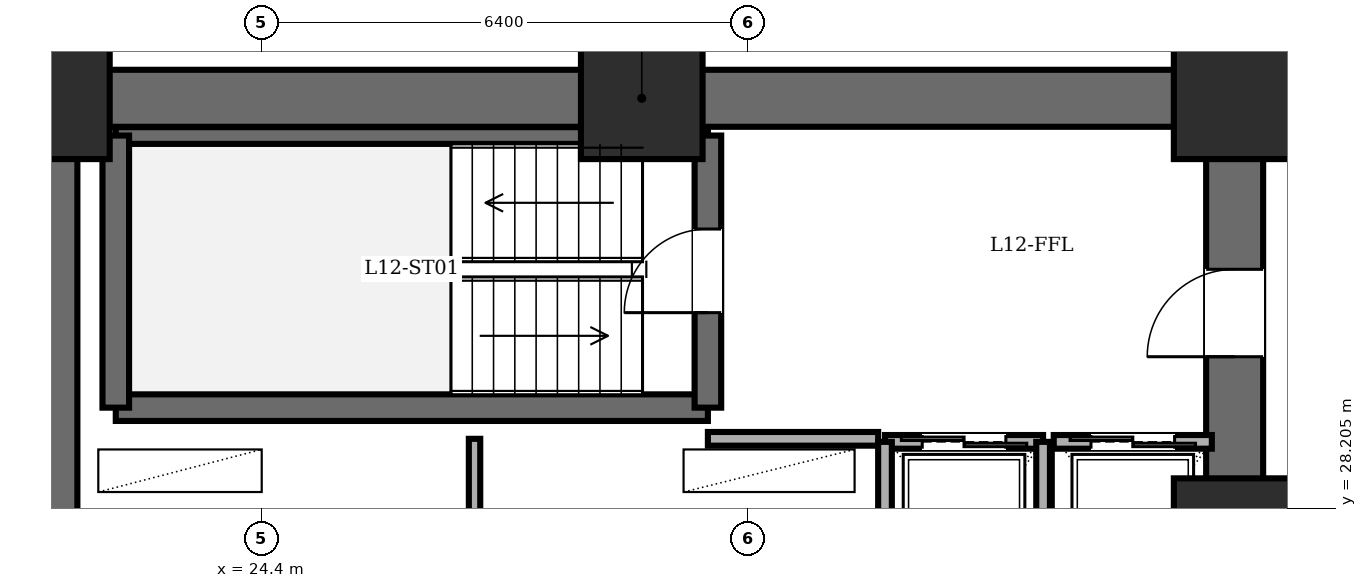
"""IFC4 building model, lengths in metres.
Left out: names, types, materials, properties, quantities, classifications, styles, units other than length and angle.
Written with IfcOpenShell. Run it as: python <this file> out.ifc"""

import sys

from ifc_helpers import new_model, si_unit, direction, frame, frame_2d, origin, origin_2d, place, context, subcontext, project, spatial, rectangle, extrude, element, fill, save


model = new_model("IFC4")
c1 = context("Model", 3, precision=1e-05, world=origin(), true_north=direction((0.0, 1.0)))
c2 = subcontext(c1, "Body", "Model", "MODEL_VIEW")
j1 = project(units=[si_unit("LENGTHUNIT", "METRE"), si_unit("PLANEANGLEUNIT", "RADIAN")], contexts=[c1])
p1 = place(None, origin())
s1 = spatial("IfcSite", under=j1, at=p1, CompositionType="ELEMENT")
p2 = place(p1, origin())
s2 = spatial("IfcBuilding", under=s1, at=p2, CompositionType="ELEMENT")
p3 = place(p2, frame((0.0, 0.0, 46.8)))
s3 = spatial("IfcBuildingStorey", under=s2, at=p3, CompositionType="ELEMENT", Elevation=46.8)
for number, where, z_axis, x_axis in (
    (1, (37.2, 27.8, 0.0), (0.0, 0.0, 1.0), (1.0, 0.0, 0.0)),
    (2, (37.2, 33.6, 0.0), (0.0, 0.0, 1.0), (1.0, 0.0, 0.0)),
    (3, (29.4, 33.6, 0.0), (0.0, 0.0, 1.0), (1.0, 0.0, 0.0)),
    (4, (21.6, 33.6, 0.0), (0.0, 0.0, 1.0), (1.0, 0.0, 0.0)),
):
    element("IfcColumn", number, at=place(p3, frame(where, z_axis=z_axis, x_axis=x_axis)), inside=s3, PredefinedType="COLUMN", context=c2, shape_type="SweptSolid", body=[
        extrude(rectangle(XDim=1.6, YDim=1.6, at=origin_2d()), origin(), (0.0, 0.0, 1.0), 3.6),
    ])
p4 = place(p3, frame((21.6, 14.4, 0.0), z_axis=(0.0, 0.0, 1.0), x_axis=(0.0, 1.0, 0.0)))
e5 = element("IfcWall", 5, at=p4, inside=s3, PredefinedType="SHEAR", context=c2, shape_type="SweptSolid", body=[
    extrude(rectangle(XDim=19.2, YDim=0.75, at=frame_2d((9.6, 0.0))), origin(), (0.0, 0.0, 1.0), 3.4),
])
p5 = place(p3, frame((21.6, 33.6, 0.0), z_axis=(0.0, 0.0, 1.0), x_axis=(1.0, 0.0, 0.0)))
e6 = element("IfcWall", 6, at=p5, inside=s3, PredefinedType="SHEAR", context=c2, shape_type="SweptSolid", body=[
    extrude(rectangle(XDim=15.6, YDim=0.75, at=frame_2d((7.8, 0.0))), origin(), (0.0, 0.0, 1.0), 3.4),
])
p6 = place(p3, frame((37.2, 14.4, 0.0), z_axis=(0.0, 0.0, 1.0), x_axis=(0.0, 1.0, 0.0)))
e7 = element("IfcWall", 7, at=p6, inside=s3, PredefinedType="SHEAR", context=c2, shape_type="SweptSolid", body=[
    extrude(rectangle(XDim=19.2, YDim=0.75, at=frame_2d((9.6, 0.0))), origin(), (0.0, 0.0, 1.0), 3.4),
])
p7 = place(p6, frame((15.8, 0.0, 0.0)))
e8 = element("IfcOpeningElement", 8, at=p7, cuts=e7, PredefinedType="OPENING", context=c2, shape_type="SweptSolid", body=[
    extrude(rectangle(XDim=1.15, YDim=2.15, at=frame_2d((0.575, 1.075))), frame((0.0, 0.385, 0.0), z_axis=(0.0, -1.0, 0.0), x_axis=(1.0, 0.0, 0.0)), (0.0, 0.0, 1.0), 0.77),
])
p8 = place(p6, frame((3.6, 0.0, 0.0)))
e9 = element("IfcOpeningElement", 9, at=p8, cuts=e7, PredefinedType="OPENING", context=c2, shape_type="SweptSolid", body=[
    extrude(rectangle(XDim=1.1, YDim=2.15, at=frame_2d((0.55, 1.075))), frame((0.0, 0.385, 0.0), z_axis=(0.0, -1.0, 0.0), x_axis=(1.0, 0.0, 0.0)), (0.0, 0.0, 1.0), 0.77),
])
p9 = place(p6, frame((8.6, 0.0, 0.0)))
e10 = element("IfcOpeningElement", 10, at=p9, cuts=e7, PredefinedType="OPENING", context=c2, shape_type="SweptSolid", body=[
    extrude(rectangle(XDim=1.3, YDim=2.2, at=frame_2d((0.65, 1.1))), frame((0.0, 0.385, 0.0), z_axis=(0.0, -1.0, 0.0), x_axis=(1.0, 0.0, 0.0)), (0.0, 0.0, 1.0), 0.77),
])
p10 = place(p3, frame((22.48, 29.53, 0.0), z_axis=(0.0, 0.0, 1.0), x_axis=(1.0, 0.0, 0.0)))
e11 = element("IfcWall", 11, at=p10, inside=s3, PredefinedType="SOLIDWALL", context=c2, shape_type="SweptSolid", body=[
    extrude(rectangle(XDim=7.79, YDim=0.35, at=frame_2d((3.895, 0.0))), origin(), (0.0, 0.0, 1.0), 3.4),
])
p11 = place(p3, frame((22.48, 33.11, 0.0), z_axis=(0.0, 0.0, 1.0), x_axis=(1.0, 0.0, 0.0)))
e12 = element("IfcWall", 12, at=p11, inside=s3, PredefinedType="PARTITIONING", context=c2, shape_type="SweptSolid", body=[
    extrude(rectangle(XDim=7.79, YDim=0.22, at=frame_2d((3.895, 0.0))), origin(), (0.0, 0.0, 1.0), 3.4),
])
p12 = place(p3, frame((22.48, 29.53, 0.0), z_axis=(0.0, 0.0, 1.0), x_axis=(0.0, 1.0, 0.0)))
e13 = element("IfcWall", 13, at=p12, inside=s3, PredefinedType="SOLIDWALL", context=c2, shape_type="SweptSolid", body=[
    extrude(rectangle(XDim=3.58, YDim=0.35, at=frame_2d((1.79, 0.0))), origin(), (0.0, 0.0, 1.0), 3.4),
])
p13 = place(p3, frame((30.27, 29.53, 0.0), z_axis=(0.0, 0.0, 1.0), x_axis=(0.0, 1.0, 0.0)))
e14 = element("IfcWall", 14, at=p13, inside=s3, PredefinedType="SOLIDWALL", context=c2, shape_type="SweptSolid", body=[
    extrude(rectangle(XDim=3.58, YDim=0.35, at=frame_2d((1.79, 0.0))), origin(), (0.0, 0.0, 1.0), 3.4),
])
p14 = place(p13, frame((1.25, 0.0, 0.0)))
e15 = element("IfcOpeningElement", 15, at=p14, cuts=e14, PredefinedType="OPENING", context=c2, shape_type="SweptSolid", body=[
    extrude(rectangle(XDim=1.1, YDim=2.15, at=frame_2d((0.55, 1.075))), frame((0.0, 0.185, 0.0), z_axis=(0.0, -1.0, 0.0), x_axis=(1.0, 0.0, 0.0)), (0.0, 0.0, 1.0), 0.37),
])
p15 = place(p3, frame((30.27, 29.12, 0.0), z_axis=(0.0, 0.0, 1.0), x_axis=(1.0, 0.0, 0.0)))
e16 = element("IfcWall", 16, at=p15, inside=s3, PredefinedType="PARTITIONING", context=c2, shape_type="SweptSolid", body=[
    extrude(rectangle(XDim=2.24, YDim=0.18, at=frame_2d((1.12, 0.0))), origin(), (0.0, 0.0, 1.0), 3.4),
])
p16 = place(p3, frame((27.2, 27.6, 0.0), z_axis=(0.0, 0.0, 1.0), x_axis=(0.0, 1.0, 0.0)))
e17 = element("IfcWall", 17, at=p16, inside=s3, PredefinedType="PARTITIONING", context=c2, shape_type="SweptSolid", body=[
    extrude(rectangle(XDim=1.52, YDim=0.15, at=frame_2d((0.76, 0.0))), origin(), (0.0, 0.0, 1.0), 3.4),
])
p17 = place(p3, frame((32.6, 29.08, 0.0), z_axis=(0.0, 0.0, 1.0), x_axis=(1.0, 0.0, 0.0)))
e18 = element("IfcWall", 18, at=p17, inside=s3, PredefinedType="PARTITIONING", context=c2, shape_type="SweptSolid", body=[
    extrude(rectangle(XDim=2.08, YDim=0.18, at=frame_2d((1.04, 0.0))), origin(), (0.0, 0.0, 1.0), 3.4),
])
p18 = place(p17, frame((0.49, 0.0, 0.0)))
e19 = element("IfcOpeningElement", 19, at=p18, cuts=e18, PredefinedType="OPENING", context=c2, shape_type="SweptSolid", body=[
    extrude(rectangle(XDim=1.1, YDim=2.2, at=frame_2d((0.55, 1.1))), frame((0.0, 0.1, 0.0), z_axis=(0.0, -1.0, 0.0), x_axis=(1.0, 0.0, 0.0)), (0.0, 0.0, 1.0), 0.2),
])
for number, where, z_axis, x_axis in (
    (20, (34.68, 26.35, 0.0), (0.0, 0.0, 1.0), (0.0, 1.0, 0.0)),
    (21, (32.6, 29.08, 0.0), (0.0, 0.0, 1.0), (0.0, -1.0, 0.0)),
):
    element("IfcWall", number, at=place(p3, frame(where, z_axis=z_axis, x_axis=x_axis)), inside=s3, PredefinedType="PARTITIONING", context=c2, shape_type="SweptSolid", body=[
        extrude(rectangle(XDim=2.73, YDim=0.18, at=frame_2d((1.365, 0.0))), origin(), (0.0, 0.0, 1.0), 3.4),
    ])
p19 = place(p3, frame((34.82, 29.08, 0.0), z_axis=(0.0, 0.0, 1.0), x_axis=(1.0, 0.0, 0.0)))
e22 = element("IfcWall", 22, at=p19, inside=s3, PredefinedType="PARTITIONING", context=c2, shape_type="SweptSolid", body=[
    extrude(rectangle(XDim=2.08, YDim=0.18, at=frame_2d((1.04, 0.0))), origin(), (0.0, 0.0, 1.0), 3.4),
])
p20 = place(p19, frame((0.49, 0.0, 0.0)))
e23 = element("IfcOpeningElement", 23, at=p20, cuts=e22, PredefinedType="OPENING", context=c2, shape_type="SweptSolid", body=[
    extrude(rectangle(XDim=1.1, YDim=2.2, at=frame_2d((0.55, 1.1))), frame((0.0, 0.1, 0.0), z_axis=(0.0, -1.0, 0.0), x_axis=(1.0, 0.0, 0.0)), (0.0, 0.0, 1.0), 0.2),
])
p21 = place(p14, origin())
e24 = element("IfcDoor", 24, at=p21, inside=s3, OperationType="SINGLE_SWING_LEFT", PredefinedType="DOOR", context=c2, shape_type="SweptSolid", body=[
    extrude(rectangle(XDim=1.1, YDim=2.15, at=frame_2d((0.55, 1.075))), frame((0.0, 0.025, 0.0), z_axis=(0.0, -1.0, 0.0), x_axis=(1.0, 0.0, 0.0)), (0.0, 0.0, 1.0), 0.05),
])
fill(e15, e24)
p22 = place(p7, origin())
e25 = element("IfcDoor", 25, at=p22, inside=s3, OperationType="SINGLE_SWING_LEFT", PredefinedType="DOOR", context=c2, shape_type="SweptSolid", body=[
    extrude(rectangle(XDim=1.15, YDim=2.15, at=frame_2d((0.575, 1.075))), frame((0.0, 0.025, 0.0), z_axis=(0.0, -1.0, 0.0), x_axis=(1.0, 0.0, 0.0)), (0.0, 0.0, 1.0), 0.05),
])
fill(e8, e25)
p23 = place(p18, origin())
e26 = element("IfcDoor", 26, at=p23, inside=s3, OperationType="DOUBLE_DOOR_SLIDING", PredefinedType="DOOR", context=c2, shape_type="SweptSolid", body=[
    extrude(rectangle(XDim=1.1, YDim=2.2, at=frame_2d((0.55, 1.1))), frame((0.0, 0.025, 0.0), z_axis=(0.0, -1.0, 0.0), x_axis=(1.0, 0.0, 0.0)), (0.0, 0.0, 1.0), 0.05),
])
fill(e19, e26)
p24 = place(p20, origin())
e27 = element("IfcDoor", 27, at=p24, inside=s3, OperationType="DOUBLE_DOOR_SLIDING", PredefinedType="DOOR", context=c2, shape_type="SweptSolid", body=[
    extrude(rectangle(XDim=1.1, YDim=2.2, at=frame_2d((0.55, 1.1))), frame((0.0, 0.025, 0.0), z_axis=(0.0, -1.0, 0.0), x_axis=(1.0, 0.0, 0.0)), (0.0, 0.0, 1.0), 0.05),
])
fill(e23, e27)
save(model, sys.argv[1])
